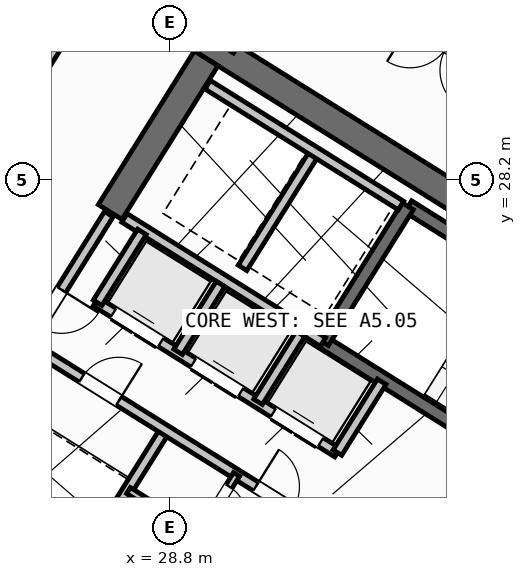
"""IFC4 building model, lengths in metres.
Left out: names, types, materials, properties, quantities, classifications, styles, units other than length and angle.
Written with IfcOpenShell. Run it as: python <this file> out.ifc"""

import sys

from ifc_helpers import new_model, si_unit, direction, frame, frame_2d, origin, origin_2d, place, context, subcontext, project, spatial, rectangle, hollow_rectangle, extrude, source, transform, mapped, element, fill, save


model = new_model("IFC4")
c1 = context("Model", 3, precision=1e-05, world=origin(), true_north=direction((0.0, 1.0)))
c2 = subcontext(c1, "Body", "Model", "MODEL_VIEW")
j1 = project(units=[si_unit("LENGTHUNIT", "METRE"), si_unit("PLANEANGLEUNIT", "RADIAN")], contexts=[c1])
p1 = place(None, origin())
s1 = spatial("IfcSite", under=j1, at=p1, CompositionType="ELEMENT")
p2 = place(p1, origin())
s2 = spatial("IfcBuilding", under=s1, at=p2, CompositionType="ELEMENT")
p3 = place(p2, frame((0.0, 0.0, 179.4)))
s3 = spatial("IfcBuildingStorey", under=s2, at=p3, CompositionType="ELEMENT", Elevation=179.4)
p4 = place(p3, frame((40.573, 24.01, 0.0), z_axis=(0.0, 0.0, 1.0), x_axis=(-0.848047359947, 0.529920442413, 0.0)))
e1 = element("IfcWall", 1, at=p4, inside=s3, PredefinedType="SHEAR", context=c2, shape_type="SweptSolid", body=[
    extrude(rectangle(XDim=13.14, YDim=0.55, at=frame_2d((6.57, 0.0))), origin(), (0.0, 0.0, 1.0), 4.55),
])
p5 = place(p3, frame((29.517, 30.594, 0.0), z_axis=(0.0, 0.0, 1.0), x_axis=(-0.529906864564, -0.848055844204, 0.0)))
e2 = element("IfcWall", 2, at=p5, inside=s3, PredefinedType="SHEAR", context=c2, shape_type="SweptSolid", body=[
    extrude(rectangle(XDim=3.575, YDim=0.55, at=frame_2d((1.788, 0.0))), origin(), (0.0, 0.0, 1.0), 4.55),
])
m1 = source(origin(), c2, "Body", "SweptSolid", [
    extrude(hollow_rectangle(XDim=0.8, YDim=0.8, WallThickness=0.032, at=origin_2d()), origin(), (0.0, 0.0, 1.0), 4.8),
])
p6 = place(p3, frame((29.928, 31.251, 0.0), z_axis=(0.0, 0.0, 1.0), x_axis=(-0.848048096156, 0.529919264233, 0.0)))
e3 = element("IfcColumn", 3, at=p6, inside=s3, PredefinedType="COLUMN", context=c2, shape_type="MappedRepresentation", body=[
    mapped(m1, transform((0.0, 0.0, 0.0), scale=1.0)),
])
p7 = place(p3, frame((31.76, 12.183, 0.0), z_axis=(0.0, 0.0, 1.0), x_axis=(-0.848047074256, 0.529920899612, 0.0)))
e4 = element("IfcWall", 4, at=p7, inside=s3, PredefinedType="STANDARD", context=c2, shape_type="SweptSolid", body=[
    extrude(rectangle(XDim=30.652, YDim=0.32, at=frame_2d((15.326, 0.0))), origin(), (0.0, 0.0, 1.0), 4.55),
])
p8 = place(p7, frame((21.52, 0.0, 0.0)))
e5 = element("IfcOpeningElement", 5, at=p8, cuts=e4, PredefinedType="OPENING", context=c2, shape_type="SweptSolid", body=[
    extrude(rectangle(XDim=1.2, YDim=2.15, at=frame_2d((0.6, 1.075))), frame((0.0, 0.17, 0.0), z_axis=(0.0, -1.0, 0.0), x_axis=(1.0, 0.0, 0.0)), (0.0, 0.0, 1.0), 0.34),
])
p9 = place(p7, frame((14.878, 0.0, 0.0)))
e6 = element("IfcOpeningElement", 6, at=p9, cuts=e4, PredefinedType="OPENING", context=c2, shape_type="SweptSolid", body=[
    extrude(rectangle(XDim=1.5, YDim=2.25, at=frame_2d((0.75, 1.125))), frame((0.0, 0.17, 0.0), z_axis=(0.0, -1.0, 0.0), x_axis=(1.0, 0.0, 0.0)), (0.0, 0.0, 1.0), 0.34),
])
p10 = place(p7, frame((1.865, 0.0, 0.75)))
e7 = element("IfcOpeningElement", 7, at=p10, cuts=e4, PredefinedType="OPENING", context=c2, shape_type="SweptSolid", body=[
    extrude(rectangle(XDim=2.4, YDim=1.6, at=frame_2d((1.2, 0.8))), frame((0.0, 0.17, 0.0), z_axis=(0.0, -1.0, 0.0), x_axis=(1.0, 0.0, 0.0)), (0.0, 0.0, 1.0), 0.34),
])
p11 = place(p7, frame((7.094, 0.0, 0.75)))
e8 = element("IfcOpeningElement", 8, at=p11, cuts=e4, PredefinedType="OPENING", context=c2, shape_type="SweptSolid", body=[
    extrude(rectangle(XDim=2.4, YDim=1.6, at=frame_2d((1.2, 0.8))), frame((0.0, 0.17, 0.0), z_axis=(0.0, -1.0, 0.0), x_axis=(1.0, 0.0, 0.0)), (0.0, 0.0, 1.0), 0.34),
])
p12 = place(p7, frame((19.404, 0.0, 0.95)))
e9 = element("IfcOpeningElement", 9, at=p12, cuts=e4, PredefinedType="OPENING", context=c2, shape_type="SweptSolid", body=[
    extrude(rectangle(XDim=1.2, YDim=1.4, at=frame_2d((0.6, 0.7))), frame((0.0, 0.17, 0.0), z_axis=(0.0, -1.0, 0.0), x_axis=(1.0, 0.0, 0.0)), (0.0, 0.0, 1.0), 0.34),
])
p13 = place(p7, frame((26.458, 0.0, 0.75)))
e10 = element("IfcOpeningElement", 10, at=p13, cuts=e4, PredefinedType="OPENING", context=c2, shape_type="SweptSolid", body=[
    extrude(rectangle(XDim=2.4, YDim=1.6, at=frame_2d((1.2, 0.8))), frame((0.0, 0.17, 0.0), z_axis=(0.0, -1.0, 0.0), x_axis=(1.0, 0.0, 0.0)), (0.0, 0.0, 1.0), 0.34),
])
p14 = place(p3, frame((31.28, 18.261, 0.0), z_axis=(0.0, 0.0, 1.0), x_axis=(-0.848051618787, 0.529913626805, 0.0)))
e11 = element("IfcWall", 11, at=p14, inside=s3, PredefinedType="SHEAR", context=c2, shape_type="SweptSolid", body=[
    extrude(rectangle(XDim=7.46, YDim=0.26, at=frame_2d((3.73, 0.0))), origin(), (0.0, 0.0, 1.0), 4.55),
])
p15 = place(p14, frame((0.36, 0.0, 0.0)))
e12 = element("IfcOpeningElement", 12, at=p15, cuts=e11, PredefinedType="OPENING", context=c2, shape_type="SweptSolid", body=[
    extrude(rectangle(XDim=0.86, YDim=2.05, at=frame_2d((0.43, 1.025))), frame((0.0, 0.14, 0.0), z_axis=(0.0, -1.0, 0.0), x_axis=(1.0, 0.0, 0.0)), (0.0, 0.0, 1.0), 0.28),
])
p16 = place(p3, frame((39.721, 23.788, 0.0), z_axis=(0.0, 0.0, 1.0), x_axis=(-0.848054434086, 0.529909121291, 0.0)))
e13 = element("IfcWall", 13, at=p16, inside=s3, PredefinedType="SHEAR", context=c2, shape_type="SweptSolid", body=[
    extrude(rectangle(XDim=7.33, YDim=0.26, at=frame_2d((3.665, 0.0))), origin(), (0.0, 0.0, 1.0), 4.55),
])
p17 = place(p3, frame((38.046, 21.108, 0.0), z_axis=(0.0, 0.0, 1.0), x_axis=(-0.848054434086, 0.529909121291, 0.0)))
e14 = element("IfcWall", 14, at=p17, inside=s3, PredefinedType="SHEAR", context=c2, shape_type="SweptSolid", body=[
    extrude(rectangle(XDim=7.33, YDim=0.26, at=frame_2d((3.665, 0.0))), origin(), (0.0, 0.0, 1.0), 4.55),
])
p18 = place(p17, frame((0.22, 0.0, 0.0)))
e15 = element("IfcOpeningElement", 15, at=p18, cuts=e14, PredefinedType="OPENING", context=c2, shape_type="SweptSolid", body=[
    extrude(rectangle(XDim=1.1, YDim=2.1, at=frame_2d((0.55, 1.05))), frame((0.0, 0.14, 0.0), z_axis=(0.0, -1.0, 0.0), x_axis=(1.0, 0.0, 0.0)), (0.0, 0.0, 1.0), 0.28),
])
p19 = place(p3, frame((33.496, 27.677, 0.0), z_axis=(0.0, 0.0, 1.0), x_axis=(-0.529908658664, -0.84805472316, 0.0)))
e16 = element("IfcWall", 16, at=p19, inside=s3, PredefinedType="SHEAR", context=c2, shape_type="SweptSolid", body=[
    extrude(rectangle(XDim=3.16, YDim=0.26, at=frame_2d((1.58, 0.0))), origin(), (0.0, 0.0, 1.0), 4.55),
])
p20 = place(p3, frame((31.822, 24.998, 0.0), z_axis=(0.0, 0.0, 1.0), x_axis=(-0.848036912365, 0.52993716162, 0.0)))
e17 = element("IfcWall", 17, at=p20, inside=s3, PredefinedType="STANDARD", context=c2, shape_type="SweptSolid", body=[
    extrude(rectangle(XDim=4.618, YDim=0.2, at=frame_2d((2.309, 0.0))), origin(), (0.0, 0.0, 1.0), 4.54),
])
p21 = place(p3, frame((32.108, 22.814, 0.0), z_axis=(0.0, 0.0, 1.0), x_axis=(-0.848042229521, 0.529928652696, 0.0)))
e18 = element("IfcWall", 18, at=p21, inside=s3, PredefinedType="STANDARD", context=c2, shape_type="SweptSolid", body=[
    extrude(rectangle(XDim=5.62, YDim=0.2, at=frame_2d((2.81, 0.0))), origin(), (0.0, 0.0, 1.0), 4.54),
])
p22 = place(p21, frame((0.39, 0.0, 0.0)))
e19 = element("IfcOpeningElement", 19, at=p22, cuts=e18, PredefinedType="OPENING", context=c2, shape_type="SweptSolid", body=[
    extrude(rectangle(XDim=1.1, YDim=2.15, at=frame_2d((0.55, 1.075))), frame((0.0, 0.11, 0.0), z_axis=(0.0, -1.0, 0.0), x_axis=(1.0, 0.0, 0.0)), (0.0, 0.0, 1.0), 0.22),
])
p23 = place(p21, frame((2.25, 0.0, 0.0)))
e20 = element("IfcOpeningElement", 20, at=p23, cuts=e18, PredefinedType="OPENING", context=c2, shape_type="SweptSolid", body=[
    extrude(rectangle(XDim=1.1, YDim=2.15, at=frame_2d((0.55, 1.075))), frame((0.0, 0.11, 0.0), z_axis=(0.0, -1.0, 0.0), x_axis=(1.0, 0.0, 0.0)), (0.0, 0.0, 1.0), 0.22),
])
p24 = place(p21, frame((4.11, 0.0, 0.0)))
e21 = element("IfcOpeningElement", 21, at=p24, cuts=e18, PredefinedType="OPENING", context=c2, shape_type="SweptSolid", body=[
    extrude(rectangle(XDim=1.1, YDim=2.15, at=frame_2d((0.55, 1.075))), frame((0.0, 0.11, 0.0), z_axis=(0.0, -1.0, 0.0), x_axis=(1.0, 0.0, 0.0)), (0.0, 0.0, 1.0), 0.22),
])
p25 = place(p3, frame((32.982, 24.213, 0.0), z_axis=(0.0, 0.0, 1.0), x_axis=(-0.529839334948, -0.84809803628, 0.0)))
e22 = element("IfcWall", 22, at=p25, inside=s3, PredefinedType="STANDARD", context=c2, shape_type="SweptSolid", body=[
    extrude(rectangle(XDim=1.65, YDim=0.2, at=frame_2d((0.825, 0.0))), origin(), (0.0, 0.0, 1.0), 4.54),
])
p26 = place(p3, frame((28.25, 27.17, 0.0), z_axis=(0.0, 0.0, 1.0), x_axis=(-0.529905827651, -0.848056492117, 0.0)))
e23 = element("IfcWall", 23, at=p26, inside=s3, PredefinedType="STANDARD", context=c2, shape_type="SweptSolid", body=[
    extrude(rectangle(XDim=1.65, YDim=0.2, at=frame_2d((0.825, 0.0))), origin(), (0.0, 0.0, 1.0), 4.54),
])
p27 = place(p3, frame((31.645, 28.716, 0.0), z_axis=(0.0, 0.0, 1.0), x_axis=(-0.52986693015, -0.848080795876, 0.0)))
e24 = element("IfcWall", 24, at=p27, inside=s3, PredefinedType="STANDARD", context=c2, shape_type="SweptSolid", body=[
    extrude(rectangle(XDim=2.66, YDim=0.2, at=frame_2d((1.33, 0.0))), origin(), (0.0, 0.0, 1.0), 4.54),
])
p28 = place(p3, frame((33.363, 27.69, 0.0), z_axis=(0.0, 0.0, 1.0), x_axis=(-0.848047090064, 0.529920874315, 0.0)))
e25 = element("IfcWall", 25, at=p28, inside=s3, PredefinedType="STANDARD", context=c2, shape_type="SweptSolid", body=[
    extrude(rectangle(XDim=4.498, YDim=0.2, at=frame_2d((2.249, 0.0))), origin(), (0.0, 0.0, 1.0), 4.54),
])
for number, where, z_axis, x_axis in (
    (26, (31.379, 25.156, 0.0), (0.0, 0.0, 1.0), (-0.53, -0.848, 0.0)),
    (27, (29.801, 26.142, 0.0), (0.0, 0.0, 1.0), (-0.53, -0.848, 0.0)),
):
    element("IfcWall", number, at=place(p3, frame(where, z_axis=z_axis, x_axis=x_axis)), inside=s3, PredefinedType="STANDARD", context=c2, shape_type="SweptSolid", body=[
        extrude(rectangle(XDim=1.58, YDim=0.2, at=frame_2d((0.79, 0.0))), origin(), (0.0, 0.0, 1.0), 4.54),
    ])
p29 = place(p3, frame((28.71, 23.263, 0.0), z_axis=(0.0, 0.0, 1.0), x_axis=(-0.529907497854, -0.848055448493, 0.0)))
e28 = element("IfcWall", 28, at=p29, inside=s3, PredefinedType="STANDARD", context=c2, shape_type="SweptSolid", body=[
    extrude(rectangle(XDim=2.88, YDim=0.2, at=frame_2d((1.44, 0.0))), origin(), (0.0, 0.0, 1.0), 4.54),
])
p30 = place(p3, frame((31.525, 21.504, 0.0), z_axis=(0.0, 0.0, 1.0), x_axis=(-0.848040211232, 0.529931882541, 0.0)))
e29 = element("IfcWall", 29, at=p30, inside=s3, PredefinedType="STANDARD", context=c2, shape_type="SweptSolid", body=[
    extrude(rectangle(XDim=6.218, YDim=0.2, at=frame_2d((3.109, 0.0))), origin(), (0.0, 0.0, 1.0), 4.54),
])
p31 = place(p30, frame((4.4, 0.0, 0.0)))
e30 = element("IfcOpeningElement", 30, at=p31, cuts=e29, PredefinedType="OPENING", context=c2, shape_type="SweptSolid", body=[
    extrude(rectangle(XDim=0.86, YDim=2.05, at=frame_2d((0.43, 1.025))), frame((0.0, 0.11, 0.0), z_axis=(0.0, -1.0, 0.0), x_axis=(1.0, 0.0, 0.0)), (0.0, 0.0, 1.0), 0.22),
])
p32 = place(p30, frame((0.35, 0.0, 0.0)))
e31 = element("IfcOpeningElement", 31, at=p32, cuts=e29, PredefinedType="OPENING", context=c2, shape_type="SweptSolid", body=[
    extrude(rectangle(XDim=0.86, YDim=2.05, at=frame_2d((0.43, 1.025))), frame((0.0, 0.11, 0.0), z_axis=(0.0, -1.0, 0.0), x_axis=(1.0, 0.0, 0.0)), (0.0, 0.0, 1.0), 0.22),
])
p33 = place(p3, frame((30.117, 22.384, 0.0), z_axis=(0.0, 0.0, 1.0), x_axis=(-0.529951914384, -0.848027693204, 0.0)))
e32 = element("IfcWall", 32, at=p33, inside=s3, PredefinedType="PLUMBINGWALL", context=c2, shape_type="SweptSolid", body=[
    extrude(rectangle(XDim=1.4, YDim=0.14, at=frame_2d((0.7, 0.0))), origin(), (0.0, 0.0, 1.0), 4.54),
])
p34 = place(p33, frame((0.28, 0.0, 0.0)))
e33 = element("IfcOpeningElement", 33, at=p34, cuts=e32, PredefinedType="OPENING", context=c2, shape_type="SweptSolid", body=[
    extrude(rectangle(XDim=0.78, YDim=2.05, at=frame_2d((0.39, 1.025))), frame((0.0, 0.08, 0.0), z_axis=(0.0, -1.0, 0.0), x_axis=(1.0, 0.0, 0.0)), (0.0, 0.0, 1.0), 0.16),
])
p35 = place(p3, frame((30.766, 20.327, 0.0), z_axis=(0.0, 0.0, 1.0), x_axis=(-0.848052663127, 0.529911955482, 0.0)))
e34 = element("IfcWall", 34, at=p35, inside=s3, PredefinedType="PLUMBINGWALL", context=c2, shape_type="SweptSolid", body=[
    extrude(rectangle(XDim=3.28, YDim=0.14, at=frame_2d((1.64, 0.0))), origin(), (0.0, 0.0, 1.0), 4.54),
])
p36 = place(p35, frame((0.25, 0.0, 0.0)))
e35 = element("IfcOpeningElement", 35, at=p36, cuts=e34, PredefinedType="OPENING", context=c2, shape_type="SweptSolid", body=[
    extrude(rectangle(XDim=0.78, YDim=2.05, at=frame_2d((0.39, 1.025))), frame((0.0, 0.08, 0.0), z_axis=(0.0, -1.0, 0.0), x_axis=(1.0, 0.0, 0.0)), (0.0, 0.0, 1.0), 0.16),
])
p37 = place(p35, frame((1.92, 0.0, 0.0)))
e36 = element("IfcOpeningElement", 36, at=p37, cuts=e34, PredefinedType="OPENING", context=c2, shape_type="SweptSolid", body=[
    extrude(rectangle(XDim=0.78, YDim=2.05, at=frame_2d((0.39, 1.025))), frame((0.0, 0.08, 0.0), z_axis=(0.0, -1.0, 0.0), x_axis=(1.0, 0.0, 0.0)), (0.0, 0.0, 1.0), 0.16),
])
p38 = place(p3, frame((27.596, 27.52, 0.0), z_axis=(0.0, 0.0, 1.0), x_axis=(-0.529865479138, -0.848081702443, 0.0)))
e37 = element("IfcWall", 37, at=p38, inside=s3, PredefinedType="STANDARD", context=c2, shape_type="SweptSolid", body=[
    extrude(rectangle(XDim=2.96, YDim=0.2, at=frame_2d((1.48, 0.0))), origin(), (0.0, 0.0, 1.0), 4.54),
])
p39 = place(p38, frame((1.76, 0.0, 0.0)))
e38 = element("IfcOpeningElement", 38, at=p39, cuts=e37, PredefinedType="OPENING", context=c2, shape_type="SweptSolid", body=[
    extrude(rectangle(XDim=0.86, YDim=2.05, at=frame_2d((0.43, 1.025))), frame((0.0, 0.11, 0.0), z_axis=(0.0, -1.0, 0.0), x_axis=(1.0, 0.0, 0.0)), (0.0, 0.0, 1.0), 0.22),
])
p40 = place(p3, frame((31.239, 38.274, 0.0), z_axis=(0.0, 0.0, 1.0), x_axis=(-0.529921796515, -0.848046513806, 0.0)))
e39 = element("IfcWall", 39, at=p40, inside=s3, PredefinedType="PARTITIONING", context=c2, shape_type="SweptSolid", body=[
    extrude(rectangle(XDim=16.5, YDim=0.16, at=frame_2d((8.25, 0.0))), origin(), (0.0, 0.0, 1.0), 4.54),
])
p41 = place(p3, frame((41.936, 26.012, 0.0), z_axis=(0.0, 0.0, 1.0), x_axis=(-0.848051154596, 0.529914369676, 0.0)))
e40 = element("IfcWall", 40, at=p41, inside=s3, PredefinedType="PARTITIONING", context=c2, shape_type="SweptSolid", body=[
    extrude(rectangle(XDim=15.57, YDim=0.16, at=frame_2d((7.785, 0.0))), origin(), (0.0, 0.0, 1.0), 4.54),
])
p42 = place(p41, frame((4.1, 0.0, 0.0)))
e41 = element("IfcOpeningElement", 41, at=p42, cuts=e40, PredefinedType="OPENING", context=c2, shape_type="SweptSolid", body=[
    extrude(rectangle(XDim=0.96, YDim=2.08, at=frame_2d((0.48, 1.04))), frame((0.0, 0.09, 0.0), z_axis=(0.0, -1.0, 0.0), x_axis=(1.0, 0.0, 0.0)), (0.0, 0.0, 1.0), 0.18),
])
p43 = place(p41, frame((8.2, 0.0, 0.0)))
e42 = element("IfcOpeningElement", 42, at=p43, cuts=e40, PredefinedType="OPENING", context=c2, shape_type="SweptSolid", body=[
    extrude(rectangle(XDim=1.7, YDim=2.2, at=frame_2d((0.85, 1.1))), frame((0.0, 0.09, 0.0), z_axis=(0.0, -1.0, 0.0), x_axis=(1.0, 0.0, 0.0)), (0.0, 0.0, 1.0), 0.18),
])
m2 = source(origin(), c2, "Body", "SweptSolid", [
    extrude(rectangle(XDim=1.1, YDim=2.15, at=frame_2d((0.55, 1.075))), frame((0.0, 0.025, 0.0), z_axis=(0.0, -1.0, 0.0), x_axis=(1.0, 0.0, 0.0)), (0.0, 0.0, 1.0), 0.05),
])
p44 = place(p22, origin())
e43 = element("IfcDoor", 43, at=p44, inside=s3, OperationType="DOUBLE_DOOR_SLIDING", PredefinedType="DOOR", context=c2, shape_type="MappedRepresentation", body=[
    mapped(m2, transform((0.0, 0.0, 0.0), scale=1.0)),
])
fill(e19, e43)
p45 = place(p23, origin())
e44 = element("IfcDoor", 44, at=p45, inside=s3, OperationType="DOUBLE_DOOR_SLIDING", PredefinedType="DOOR", context=c2, shape_type="MappedRepresentation", body=[
    mapped(m2, transform((0.0, 0.0, 0.0), scale=1.0)),
])
fill(e20, e44)
p46 = place(p24, origin())
e45 = element("IfcDoor", 45, at=p46, inside=s3, OperationType="DOUBLE_DOOR_SLIDING", PredefinedType="DOOR", context=c2, shape_type="MappedRepresentation", body=[
    mapped(m2, transform((0.0, 0.0, 0.0), scale=1.0)),
])
fill(e21, e45)
m3 = source(origin(), c2, "Body", "SweptSolid", [
    extrude(rectangle(XDim=0.86, YDim=2.05, at=frame_2d((0.43, 1.025))), frame((0.0, 0.025, 0.0), z_axis=(0.0, -1.0, 0.0), x_axis=(1.0, 0.0, 0.0)), (0.0, 0.0, 1.0), 0.05),
])
p47 = place(p31, frame((0.86, 0.0, 0.0), z_axis=(0.0, 0.0, 1.0), x_axis=(-1.0, 0.0, 0.0)))
e46 = element("IfcDoor", 46, at=p47, inside=s3, OperationType="SINGLE_SWING_RIGHT", PredefinedType="DOOR", context=c2, shape_type="MappedRepresentation", body=[
    mapped(m3, transform((0.0, 0.0, 0.0), scale=1.0)),
])
fill(e30, e46)
p48 = place(p32, frame((0.86, 0.0, 0.0), z_axis=(0.0, 0.0, 1.0), x_axis=(-1.0, 0.0, 0.0)))
e47 = element("IfcDoor", 47, at=p48, inside=s3, OperationType="SINGLE_SWING_LEFT", PredefinedType="DOOR", context=c2, shape_type="MappedRepresentation", body=[
    mapped(m3, transform((0.0, 0.0, 0.0), scale=1.0)),
])
fill(e31, e47)
m4 = source(origin(), c2, "Body", "SweptSolid", [
    extrude(rectangle(XDim=0.78, YDim=2.05, at=frame_2d((0.39, 1.025))), frame((0.0, 0.025, 0.0), z_axis=(0.0, -1.0, 0.0), x_axis=(1.0, 0.0, 0.0)), (0.0, 0.0, 1.0), 0.05),
])
p49 = place(p34, origin())
e48 = element("IfcDoor", 48, at=p49, inside=s3, OperationType="SINGLE_SWING_RIGHT", PredefinedType="DOOR", context=c2, shape_type="MappedRepresentation", body=[
    mapped(m4, transform((0.0, 0.0, 0.0), scale=1.0)),
])
fill(e33, e48)
p50 = place(p39, origin())
e49 = element("IfcDoor", 49, at=p50, inside=s3, OperationType="SINGLE_SWING_LEFT", PredefinedType="DOOR", context=c2, shape_type="MappedRepresentation", body=[
    mapped(m3, transform((0.0, 0.0, 0.0), scale=1.0)),
])
fill(e38, e49)
m5 = source(origin(), c2, "Body", "SweptSolid", [
    extrude(rectangle(XDim=1.7, YDim=2.2, at=frame_2d((0.85, 1.1))), frame((0.0, 0.025, 0.0), z_axis=(0.0, -1.0, 0.0), x_axis=(1.0, 0.0, 0.0)), (0.0, 0.0, 1.0), 0.05),
])
p51 = place(p43, origin())
e50 = element("IfcDoor", 50, at=p51, inside=s3, OperationType="DOUBLE_DOOR_SINGLE_SWING", PredefinedType="DOOR", context=c2, shape_type="MappedRepresentation", body=[
    mapped(m5, transform((0.0, 0.0, 0.0), scale=1.0)),
])
fill(e42, e50)
save(model, sys.argv[1])
